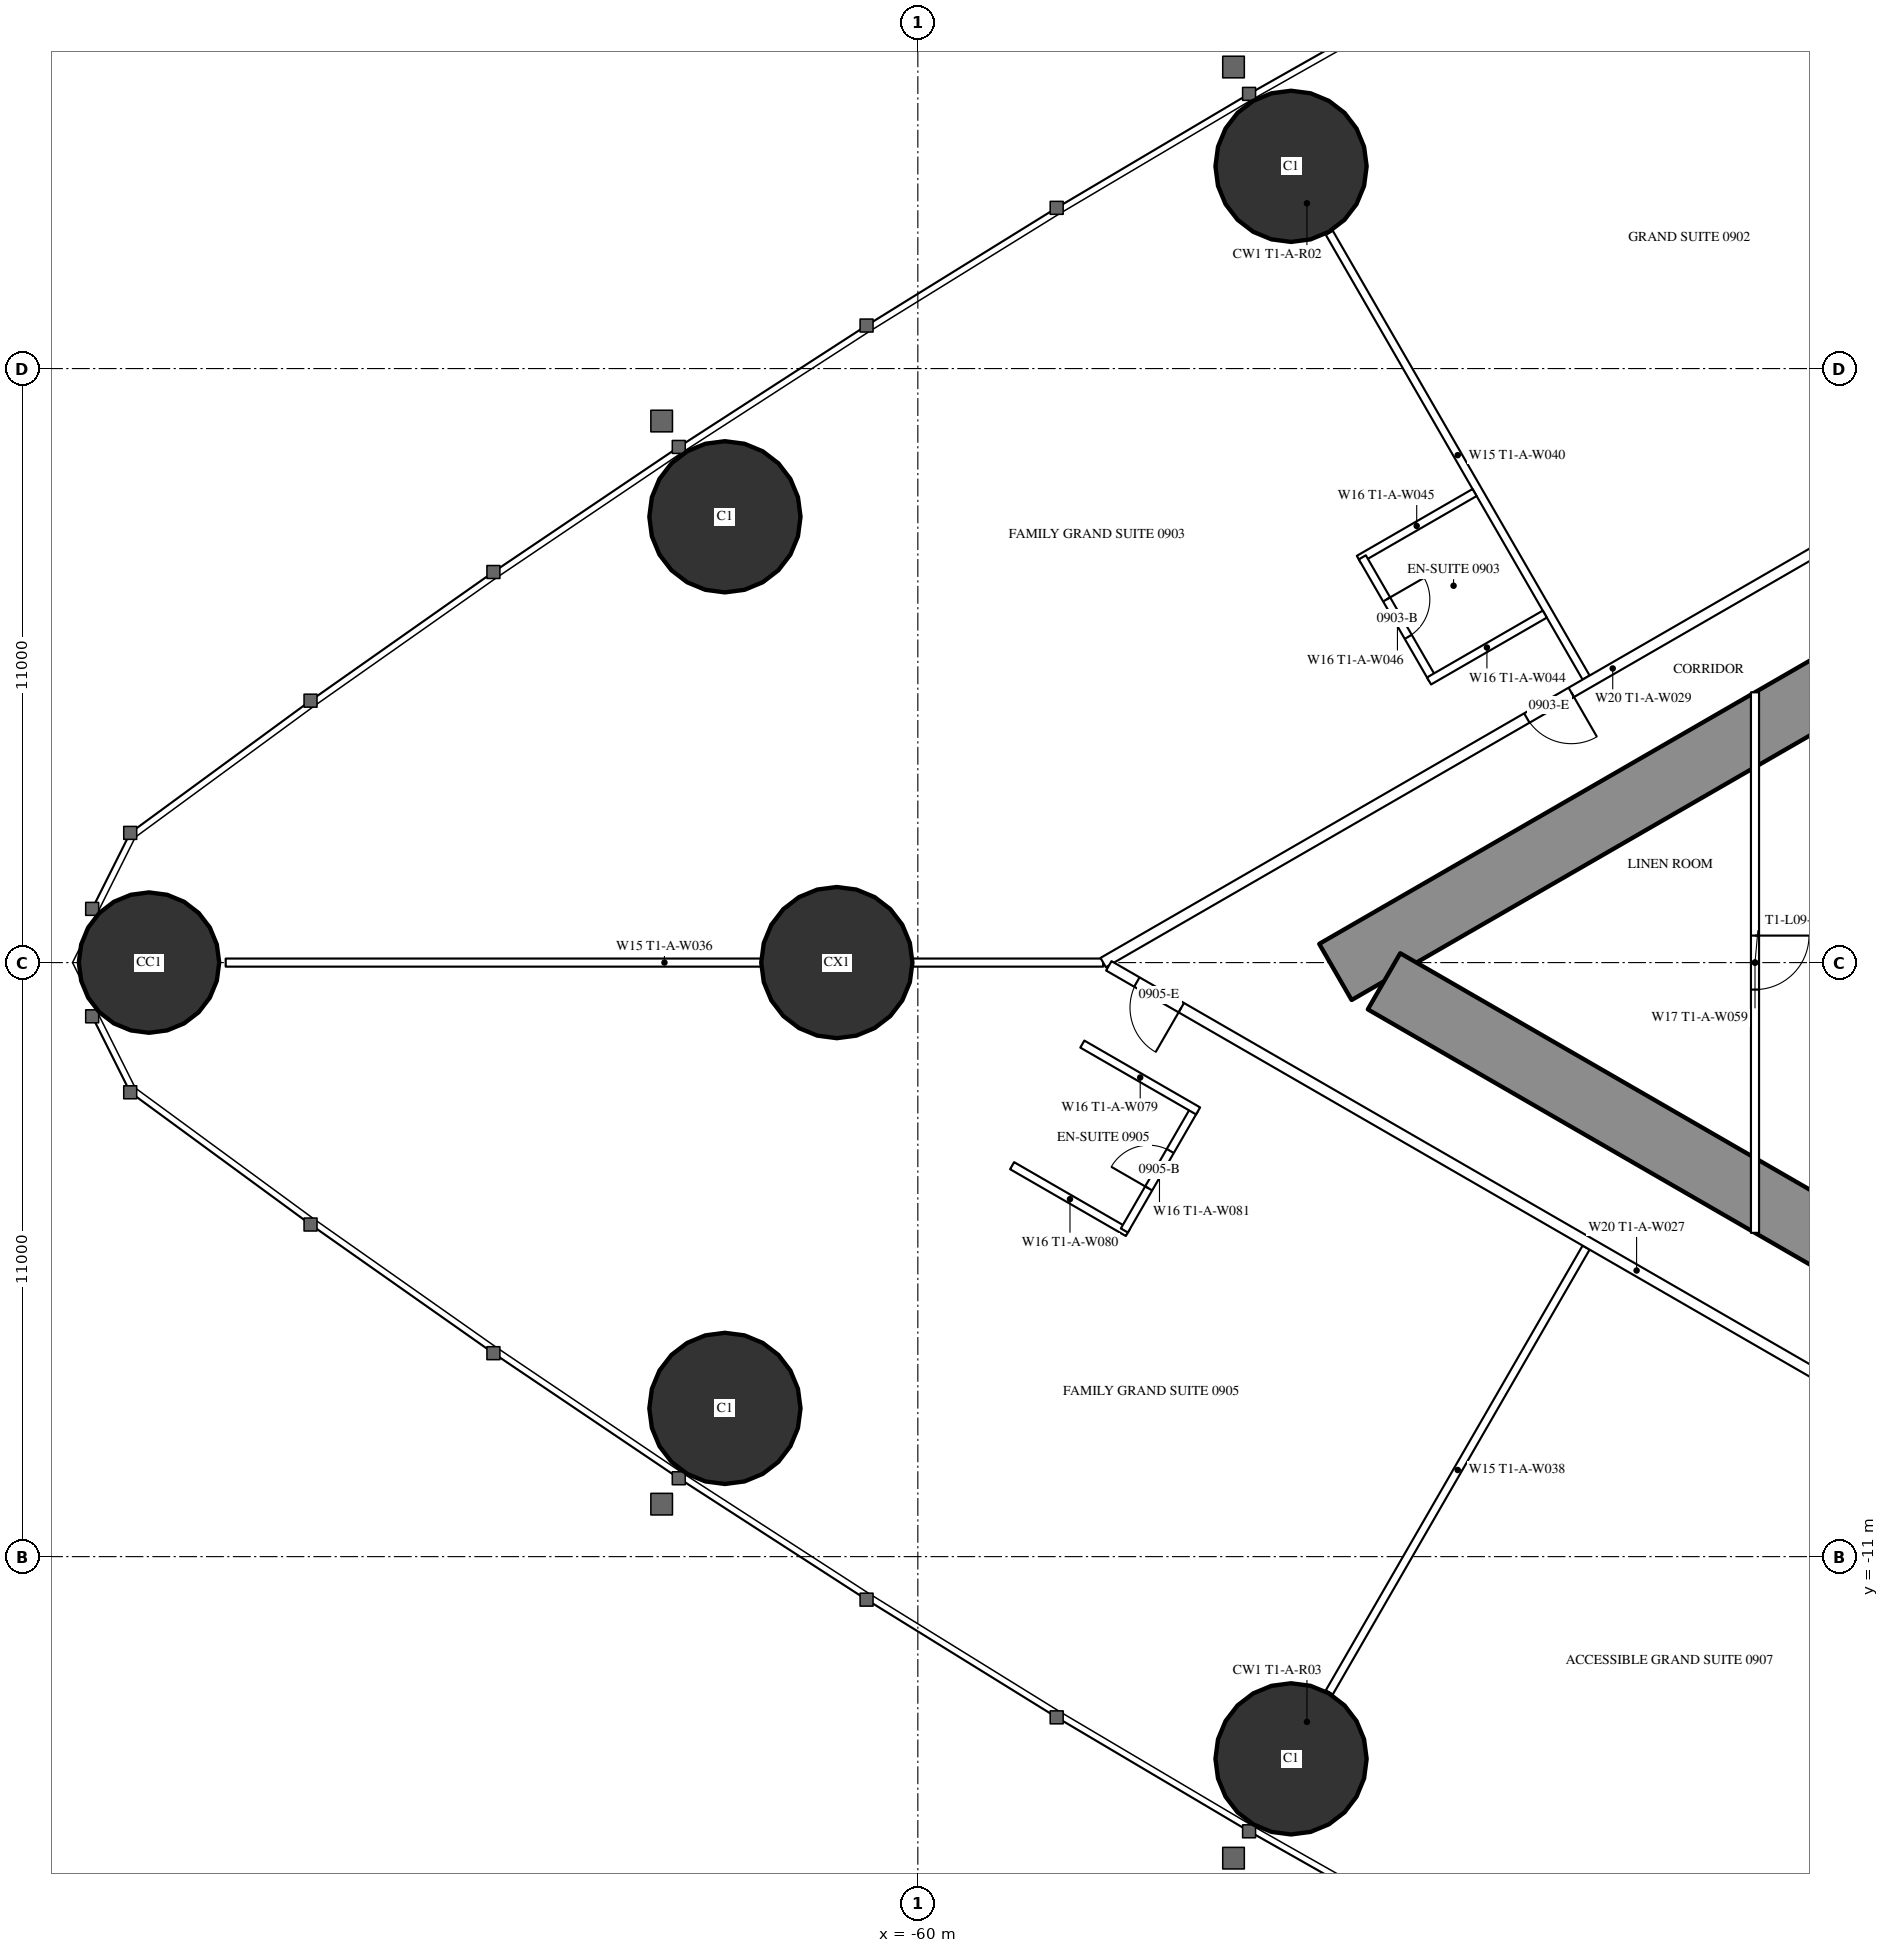
"""IFC4 building model, lengths in metres.
Left out: names, types, materials, properties, quantities, classifications, styles, units other than length and angle.
Written with IfcOpenShell. Run it as: python <this file> out.ifc"""

import sys

from ifc_helpers import new_model, si_unit, direction, frame, frame_2d, origin, origin_2d, place, context, subcontext, project, spatial, rectangle, hollow_circle, extrude, element, fill, save


model = new_model("IFC4")
c1 = context("Model", 3, precision=1e-05, world=origin(), true_north=direction((0.0, 1.0)))
c2 = subcontext(c1, "Body", "Model", "MODEL_VIEW")
j1 = project(units=[si_unit("LENGTHUNIT", "METRE"), si_unit("PLANEANGLEUNIT", "RADIAN")], contexts=[c1])
p1 = place(None, origin())
s1 = spatial("IfcSite", under=j1, at=p1, CompositionType="ELEMENT")
p2 = place(p1, origin())
s2 = spatial("IfcBuilding", under=s1, at=p2, CompositionType="ELEMENT")
p3 = place(p2, frame((0.0, 0.0, 39.0)))
s3 = spatial("IfcBuildingStorey", under=s2, at=p3, CompositionType="ELEMENT", Elevation=39.0)
p4 = place(p3, frame((-74.235, 0.0, 0.0), z_axis=(0.0, 0.0, 1.0), x_axis=(1.0, 0.0, 0.0)))
e1 = element("IfcColumn", 1, at=p4, inside=s3, PredefinedType="COLUMN", context=c2, shape_type="SweptSolid", body=[
    extrude(hollow_circle(Radius=1.3, WallThickness=0.1, at=origin_2d()), origin(), (0.0, 0.0, 1.0), 3.5),
])
for number, where, z_axis, x_axis in (
    (2, (-63.572, -8.255, 0.0), (0.0, 0.0, 1.0), (1.0, 0.0, 0.0)),
    (3, (-53.09, -14.745, 0.0), (0.0, 0.0, 1.0), (1.0, 0.0, 0.0)),
    (4, (-53.09, 14.745, 0.0), (0.0, 0.0, 1.0), (1.0, 0.0, 0.0)),
    (5, (-63.572, 8.255, 0.0), (0.0, 0.0, 1.0), (1.0, 0.0, 0.0)),
):
    element("IfcColumn", number, at=place(p3, frame(where, z_axis=z_axis, x_axis=x_axis)), inside=s3, PredefinedType="COLUMN", context=c2, shape_type="SweptSolid", body=[
        extrude(hollow_circle(Radius=1.4, WallThickness=0.12, at=origin_2d()), origin(), (0.0, 0.0, 1.0), 3.5),
    ])
p5 = place(p3, frame((-61.5, 0.0, 0.0), z_axis=(0.0, 0.0, 1.0), x_axis=(1.0, 0.0, 0.0)))
e6 = element("IfcColumn", 6, at=p5, inside=s3, PredefinedType="COLUMN", context=c2, shape_type="SweptSolid", body=[
    extrude(hollow_circle(Radius=1.4, WallThickness=0.1, at=origin_2d()), origin(), (0.0, 0.0, 1.0), 3.5),
])
p6 = place(p3, frame((-27.2, 14.3, 0.0), z_axis=(0.0, 0.0, 1.0), x_axis=(-0.866026593062, -0.499997940104, 0.0)))
e7 = element("IfcWall", 7, at=p6, inside=s3, PredefinedType="SHEAR", context=c2, shape_type="SweptSolid", body=[
    extrude(rectangle(XDim=28.946, YDim=1.2, at=frame_2d((14.473, 0.0))), origin(), (0.0, 0.0, 1.0), 3.5),
])
p7 = place(p6, frame((4.6, 0.0, 0.0)))
e8 = element("IfcOpeningElement", 8, at=p7, cuts=e7, PredefinedType="OPENING", context=c2, shape_type="SweptSolid", body=[
    extrude(rectangle(XDim=1.0, YDim=2.2, at=frame_2d((0.5, 1.1))), frame((0.0, 0.61, 0.0), z_axis=(0.0, -1.0, 0.0), x_axis=(1.0, 0.0, 0.0)), (0.0, 0.0, 1.0), 1.22),
])
p8 = place(p6, frame((13.395, 0.0, 0.0)))
e9 = element("IfcOpeningElement", 9, at=p8, cuts=e7, PredefinedType="OPENING", context=c2, shape_type="SweptSolid", body=[
    extrude(rectangle(XDim=1.8, YDim=2.2, at=frame_2d((0.9, 1.1))), frame((0.0, 0.61, 0.0), z_axis=(0.0, -1.0, 0.0), x_axis=(1.0, 0.0, 0.0)), (0.0, 0.0, 1.0), 1.22),
])
p9 = place(p3, frame((-27.2, -14.3, 0.0), z_axis=(0.0, 0.0, 1.0), x_axis=(-0.866024021859, 0.500002393557, 0.0)))
e10 = element("IfcWall", 10, at=p9, inside=s3, PredefinedType="SHEAR", context=c2, shape_type="SweptSolid", body=[
    extrude(rectangle(XDim=27.907, YDim=1.2, at=frame_2d((13.954, 0.0))), origin(), (0.0, 0.0, 1.0), 3.5),
])
p10 = place(p9, frame((4.6, 0.0, 0.0)))
e11 = element("IfcOpeningElement", 11, at=p10, cuts=e10, PredefinedType="OPENING", context=c2, shape_type="SweptSolid", body=[
    extrude(rectangle(XDim=1.0, YDim=2.2, at=frame_2d((0.5, 1.1))), frame((0.0, 0.61, 0.0), z_axis=(0.0, -1.0, 0.0), x_axis=(1.0, 0.0, 0.0)), (0.0, 0.0, 1.0), 1.22),
])
p11 = place(p9, frame((13.395, 0.0, 0.0)))
e12 = element("IfcOpeningElement", 12, at=p11, cuts=e10, PredefinedType="OPENING", context=c2, shape_type="SweptSolid", body=[
    extrude(rectangle(XDim=1.8, YDim=2.2, at=frame_2d((0.9, 1.1))), frame((0.0, 0.61, 0.0), z_axis=(0.0, -1.0, 0.0), x_axis=(1.0, 0.0, 0.0)), (0.0, 0.0, 1.0), 1.22),
])
for number, where, z_axis, x_axis in (
    (13, (-47.627, 5.278, 0.0), (0.0, 0.0, 1.0), (-0.5, 0.866, 0.0)),
    (14, (-47.627, -5.278, 0.0), (0.0, 0.0, 1.0), (-0.5, -0.866, 0.0)),
):
    element("IfcWall", number, at=place(p3, frame(where, z_axis=z_axis, x_axis=x_axis)), inside=s3, PredefinedType="PARTITIONING", context=c2, shape_type="SweptSolid", body=[
        extrude(rectangle(XDim=9.51, YDim=0.15, at=frame_2d((4.755, 0.0))), origin(), (0.0, 0.0, 1.0), 2.25),
    ])
p12 = place(p3, frame((-56.568, 0.0, 0.0), z_axis=(0.0, 0.0, 1.0), x_axis=(-1.0, 0.0, 0.0)))
e15 = element("IfcWall", 15, at=p12, inside=s3, PredefinedType="PARTITIONING", context=c2, shape_type="SweptSolid", body=[
    extrude(rectangle(XDim=16.247, YDim=0.15, at=frame_2d((8.124, 0.0))), origin(), (0.0, 0.0, 1.0), 2.25),
])
p13 = place(p3, frame((-37.7, 10.894, 0.0), z_axis=(0.0, 0.0, 1.0), x_axis=(-0.866027905338, -0.499995667157, 0.0)))
e16 = element("IfcWall", 16, at=p13, inside=s3, PredefinedType="PARTITIONING", context=c2, shape_type="SweptSolid", body=[
    extrude(rectangle(XDim=21.787, YDim=0.2, at=frame_2d((10.894, 0.0))), origin(), (0.0, 0.0, 1.0), 3.25),
])
p14 = place(p13, frame((11.78, 0.0, 0.0)))
e17 = element("IfcOpeningElement", 17, at=p14, cuts=e16, PredefinedType="OPENING", context=c2, shape_type="SweptSolid", body=[
    extrude(rectangle(XDim=0.95, YDim=2.2, at=frame_2d((0.475, 1.1))), frame((0.0, 0.11, 0.0), z_axis=(0.0, -1.0, 0.0), x_axis=(1.0, 0.0, 0.0)), (0.0, 0.0, 1.0), 0.22),
])
p15 = place(p13, frame((2.95, 0.0, 0.0)))
e18 = element("IfcOpeningElement", 18, at=p15, cuts=e16, PredefinedType="OPENING", context=c2, shape_type="SweptSolid", body=[
    extrude(rectangle(XDim=0.95, YDim=2.2, at=frame_2d((0.475, 1.1))), frame((0.0, 0.11, 0.0), z_axis=(0.0, -1.0, 0.0), x_axis=(1.0, 0.0, 0.0)), (0.0, 0.0, 1.0), 0.22),
])
p16 = place(p3, frame((-36.92, -11.344, 0.0), z_axis=(0.0, 0.0, 1.0), x_axis=(-0.866028313256, 0.499994960614, 0.0)))
e19 = element("IfcWall", 19, at=p16, inside=s3, PredefinedType="PARTITIONING", context=c2, shape_type="SweptSolid", body=[
    extrude(rectangle(XDim=22.568, YDim=0.2, at=frame_2d((11.284, 0.0))), origin(), (0.0, 0.0, 1.0), 3.25),
])
p17 = place(p16, frame((21.018, 0.0, 0.0)))
e20 = element("IfcOpeningElement", 20, at=p17, cuts=e19, PredefinedType="OPENING", context=c2, shape_type="SweptSolid", body=[
    extrude(rectangle(XDim=0.95, YDim=2.2, at=frame_2d((0.475, 1.1))), frame((0.0, 0.11, 0.0), z_axis=(0.0, -1.0, 0.0), x_axis=(1.0, 0.0, 0.0)), (0.0, 0.0, 1.0), 0.22),
])
p18 = place(p16, frame((3.35, 0.0, 0.0)))
e21 = element("IfcOpeningElement", 21, at=p18, cuts=e19, PredefinedType="OPENING", context=c2, shape_type="SweptSolid", body=[
    extrude(rectangle(XDim=1.0, YDim=2.2, at=frame_2d((0.5, 1.1))), frame((0.0, 0.11, 0.0), z_axis=(0.0, -1.0, 0.0), x_axis=(1.0, 0.0, 0.0)), (0.0, 0.0, 1.0), 0.22),
])
p19 = place(p3, frame((-49.692, 8.704, 0.0), z_axis=(0.0, 0.0, 1.0), x_axis=(-0.866073894602, -0.499916002032, 0.0)))
e22 = element("IfcWall", 22, at=p19, inside=s3, PredefinedType="PARTITIONING", context=c2, shape_type="SweptSolid", body=[
    extrude(rectangle(XDim=2.475, YDim=0.15, at=frame_2d((1.238, 0.0))), origin(), (0.0, 0.0, 1.0), 3.25),
])
p20 = place(p3, frame((-50.47, 5.253, 0.0), z_axis=(0.0, 0.0, 1.0), x_axis=(-0.500006934395, 0.866021400173, 0.0)))
e23 = element("IfcWall", 23, at=p20, inside=s3, PredefinedType="PARTITIONING", context=c2, shape_type="SweptSolid", body=[
    extrude(rectangle(XDim=2.6, YDim=0.15, at=frame_2d((1.3, 0.0))), origin(), (0.0, 0.0, 1.0), 3.25),
])
p21 = place(p20, frame((0.9, 0.0, 0.0)))
e24 = element("IfcOpeningElement", 24, at=p21, cuts=e23, PredefinedType="OPENING", context=c2, shape_type="SweptSolid", body=[
    extrude(rectangle(XDim=0.8, YDim=2.2, at=frame_2d((0.4, 1.1))), frame((0.0, 0.085, 0.0), z_axis=(0.0, -1.0, 0.0), x_axis=(1.0, 0.0, 0.0)), (0.0, 0.0, 1.0), 0.17),
])
p22 = place(p3, frame((-48.392, 6.453, 0.0), z_axis=(0.0, 0.0, 1.0), x_axis=(-0.86604923931, -0.499958713387, 0.0)))
e25 = element("IfcWall", 25, at=p22, inside=s3, PredefinedType="PARTITIONING", context=c2, shape_type="SweptSolid", body=[
    extrude(rectangle(XDim=2.475, YDim=0.15, at=frame_2d((1.237, 0.0))), origin(), (0.0, 0.0, 1.0), 3.25),
])
p23 = place(p3, frame((-56.111, -4.998, 0.0), z_axis=(0.0, 0.0, 1.0), x_axis=(-0.866031185235, 0.4999899861, 0.0)))
e26 = element("IfcWall", 26, at=p23, inside=s3, PredefinedType="PARTITIONING", context=c2, shape_type="SweptSolid", body=[
    extrude(rectangle(XDim=2.475, YDim=0.15, at=frame_2d((1.238, 0.0))), origin(), (0.0, 0.0, 1.0), 3.25),
])
p24 = place(p3, frame((-54.876, -2.709, 0.0), z_axis=(0.0, 0.0, 1.0), x_axis=(-0.500006934395, -0.866021400173, 0.0)))
e27 = element("IfcWall", 27, at=p24, inside=s3, PredefinedType="PARTITIONING", context=c2, shape_type="SweptSolid", body=[
    extrude(rectangle(XDim=2.6, YDim=0.15, at=frame_2d((1.3, 0.0))), origin(), (0.0, 0.0, 1.0), 3.25),
])
p25 = place(p24, frame((0.9, 0.0, 0.0)))
e28 = element("IfcOpeningElement", 28, at=p25, cuts=e27, PredefinedType="OPENING", context=c2, shape_type="SweptSolid", body=[
    extrude(rectangle(XDim=0.8, YDim=2.2, at=frame_2d((0.4, 1.1))), frame((0.0, 0.085, 0.0), z_axis=(0.0, -1.0, 0.0), x_axis=(1.0, 0.0, 0.0)), (0.0, 0.0, 1.0), 0.17),
])
p26 = place(p3, frame((-54.811, -2.747, 0.0), z_axis=(0.0, 0.0, 1.0), x_axis=(-0.866031185235, 0.4999899861, 0.0)))
e29 = element("IfcWall", 29, at=p26, inside=s3, PredefinedType="PARTITIONING", context=c2, shape_type="SweptSolid", body=[
    extrude(rectangle(XDim=2.475, YDim=0.15, at=frame_2d((1.238, 0.0))), origin(), (0.0, 0.0, 1.0), 3.25),
])
p27 = place(p3, frame((-44.5, 5.005, 0.0), z_axis=(0.0, 0.0, 1.0), x_axis=(0.0, -1.0, 0.0)))
e30 = element("IfcWall", 30, at=p27, inside=s3, PredefinedType="PARTITIONING", context=c2, shape_type="SweptSolid", body=[
    extrude(rectangle(XDim=10.009, YDim=0.15, at=frame_2d((5.005, 0.0))), origin(), (0.0, 0.0, 1.0), 2.45),
])
p28 = place(p27, frame((4.505, 0.0, 0.0)))
e31 = element("IfcOpeningElement", 31, at=p28, cuts=e30, PredefinedType="OPENING", context=c2, shape_type="SweptSolid", body=[
    extrude(rectangle(XDim=1.0, YDim=2.2, at=frame_2d((0.5, 1.1))), frame((0.0, 0.085, 0.0), z_axis=(0.0, -1.0, 0.0), x_axis=(1.0, 0.0, 0.0)), (0.0, 0.0, 1.0), 0.17),
])
p29 = place(p21, origin())
e32 = element("IfcDoor", 32, at=p29, inside=s3, OperationType="SINGLE_SWING_RIGHT", PredefinedType="DOOR", context=c2, shape_type="SweptSolid", body=[
    extrude(rectangle(XDim=0.8, YDim=2.2, at=frame_2d((0.4, 1.1))), frame((0.0, 0.025, 0.0), z_axis=(0.0, -1.0, 0.0), x_axis=(1.0, 0.0, 0.0)), (0.0, 0.0, 1.0), 0.05),
])
fill(e24, e32)
p30 = place(p14, origin())
e33 = element("IfcDoor", 33, at=p30, inside=s3, OperationType="SINGLE_SWING_LEFT", PredefinedType="DOOR", context=c2, shape_type="SweptSolid", body=[
    extrude(rectangle(XDim=0.95, YDim=2.2, at=frame_2d((0.475, 1.1))), frame((0.0, 0.025, 0.0), z_axis=(0.0, -1.0, 0.0), x_axis=(1.0, 0.0, 0.0)), (0.0, 0.0, 1.0), 0.05),
])
fill(e17, e33)
p31 = place(p25, origin())
e34 = element("IfcDoor", 34, at=p31, inside=s3, OperationType="SINGLE_SWING_RIGHT", PredefinedType="DOOR", context=c2, shape_type="SweptSolid", body=[
    extrude(rectangle(XDim=0.8, YDim=2.2, at=frame_2d((0.4, 1.1))), frame((0.0, 0.025, 0.0), z_axis=(0.0, -1.0, 0.0), x_axis=(1.0, 0.0, 0.0)), (0.0, 0.0, 1.0), 0.05),
])
fill(e28, e34)
p32 = place(p17, origin())
e35 = element("IfcDoor", 35, at=p32, inside=s3, OperationType="SINGLE_SWING_LEFT", PredefinedType="DOOR", context=c2, shape_type="SweptSolid", body=[
    extrude(rectangle(XDim=0.95, YDim=2.2, at=frame_2d((0.475, 1.1))), frame((0.0, 0.025, 0.0), z_axis=(0.0, -1.0, 0.0), x_axis=(1.0, 0.0, 0.0)), (0.0, 0.0, 1.0), 0.05),
])
fill(e20, e35)
p33 = place(p28, origin())
e36 = element("IfcDoor", 36, at=p33, inside=s3, OperationType="SINGLE_SWING_LEFT", PredefinedType="DOOR", context=c2, shape_type="SweptSolid", body=[
    extrude(rectangle(XDim=1.0, YDim=2.2, at=frame_2d((0.5, 1.1))), frame((0.0, 0.025, 0.0), z_axis=(0.0, -1.0, 0.0), x_axis=(1.0, 0.0, 0.0)), (0.0, 0.0, 1.0), 0.05),
])
fill(e31, e36)
save(model, sys.argv[1])
